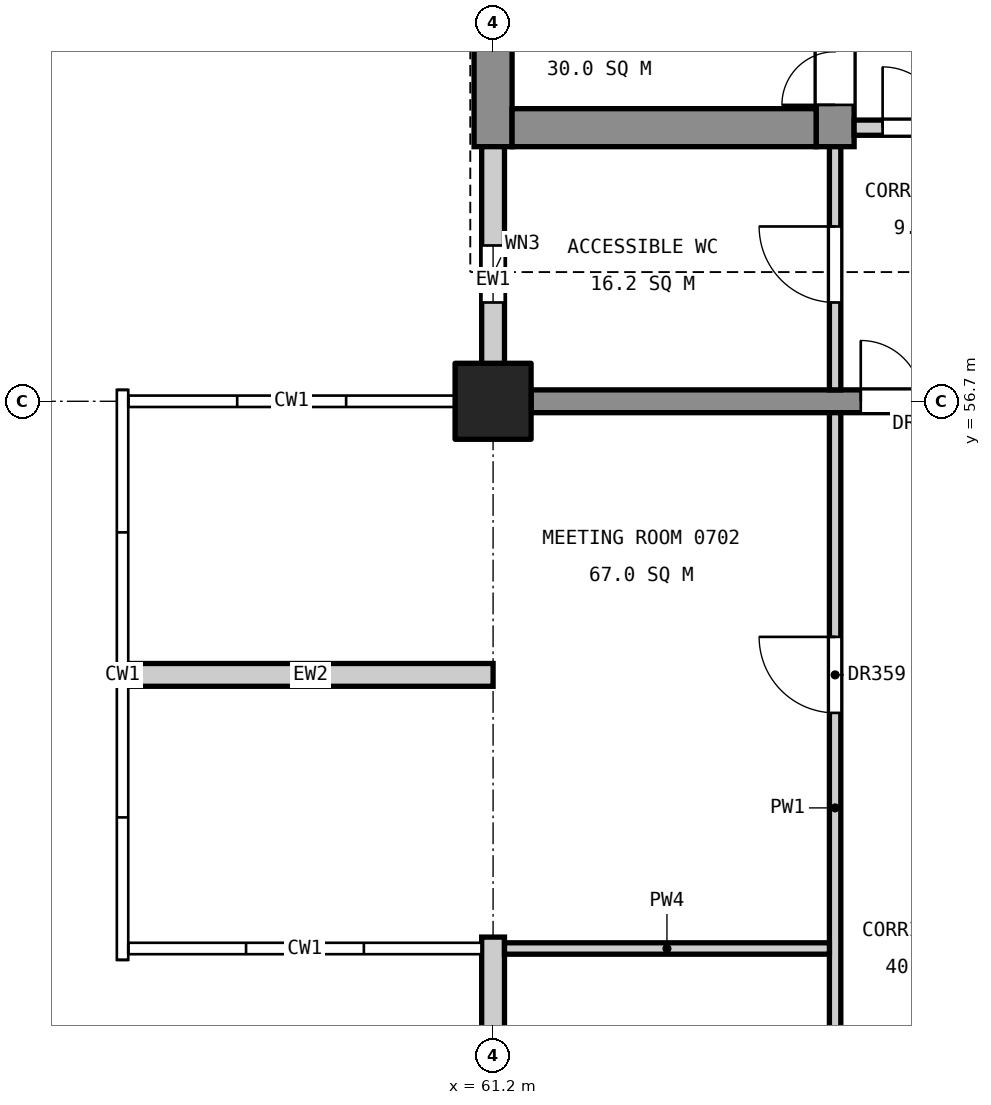
"""IFC4 building model, lengths in metres.
Left out: names, types, materials, properties, quantities, classifications, styles, units other than length and angle.
Written with IfcOpenShell. Run it as: python <this file> out.ifc"""

import sys

from ifc_helpers import new_model, si_unit, direction, frame, frame_2d, origin, origin_2d, place, context, subcontext, project, spatial, rectangle, extrude, element, fill, save


model = new_model("IFC4")
c1 = context("Model", 3, precision=1e-05, world=origin(), true_north=direction((0.0, 1.0)))
c2 = subcontext(c1, "Body", "Model", "MODEL_VIEW")
j1 = project(units=[si_unit("LENGTHUNIT", "METRE"), si_unit("PLANEANGLEUNIT", "RADIAN")], contexts=[c1])
p1 = place(None, origin())
s1 = spatial("IfcSite", under=j1, at=p1, CompositionType="ELEMENT")
p2 = place(p1, origin())
s2 = spatial("IfcBuilding", under=s1, at=p2, CompositionType="ELEMENT")
p3 = place(p2, frame((0.0, 0.0, 36.6)))
s3 = spatial("IfcBuildingStorey", under=s2, at=p3, CompositionType="ELEMENT", Elevation=36.6)
p4 = place(p3, frame((61.2, 56.7, 0.0), z_axis=(0.0, 0.0, 1.0), x_axis=(1.0, 0.0, 0.0)))
e1 = element("IfcColumn", 1, at=p4, inside=s3, PredefinedType="COLUMN", context=c2, shape_type="SweptSolid", body=[
    extrude(rectangle(XDim=1.0, YDim=1.0, at=origin_2d()), origin(), (0.0, 0.0, 1.0), 4.8),
])
p5 = place(p3, frame((61.2, 60.05, 0.0), z_axis=(0.0, 0.0, 1.0), x_axis=(0.0, 1.0, 0.0)))
e2 = element("IfcWall", 2, at=p5, inside=s3, PredefinedType="SHEAR", context=c2, shape_type="SweptSolid", body=[
    extrude(rectangle(XDim=14.9, YDim=0.5, at=frame_2d((7.45, 0.0))), origin(), (0.0, 0.0, 1.0), 4.55),
])
p6 = place(p5, frame((6.16, 0.0, 3.4)))
e3 = element("IfcOpeningElement", 3, at=p6, cuts=e2, PredefinedType="OPENING", context=c2, shape_type="SweptSolid", body=[
    extrude(rectangle(XDim=1.2, YDim=0.9, at=frame_2d((0.6, 0.45))), frame((0.0, 0.26, 0.0), z_axis=(0.0, -1.0, 0.0), x_axis=(1.0, 0.0, 0.0)), (0.0, 0.0, 1.0), 0.52),
])
p7 = place(p3, frame((65.7, 60.05, 0.0), z_axis=(0.0, 0.0, 1.0), x_axis=(0.0, 1.0, 0.0)))
e4 = element("IfcWall", 4, at=p7, inside=s3, PredefinedType="SHEAR", context=c2, shape_type="SweptSolid", body=[
    extrude(rectangle(XDim=14.9, YDim=0.5, at=frame_2d((7.45, 0.0))), origin(), (0.0, 0.0, 1.0), 4.55),
])
p8 = place(p7, frame((0.55, 0.0, 0.0)))
e5 = element("IfcOpeningElement", 5, at=p8, cuts=e4, PredefinedType="OPENING", context=c2, shape_type="SweptSolid", body=[
    extrude(rectangle(XDim=1.4, YDim=2.1, at=frame_2d((0.7, 1.05))), frame((0.0, 0.26, 0.0), z_axis=(0.0, -1.0, 0.0), x_axis=(1.0, 0.0, 0.0)), (0.0, 0.0, 1.0), 0.52),
])
p9 = place(p7, frame((8.85, 0.0, 0.0)))
e6 = element("IfcOpeningElement", 6, at=p9, cuts=e4, PredefinedType="OPENING", context=c2, shape_type="SweptSolid", body=[
    extrude(rectangle(XDim=1.1, YDim=2.1, at=frame_2d((0.55, 1.05))), frame((0.0, 0.26, 0.0), z_axis=(0.0, -1.0, 0.0), x_axis=(1.0, 0.0, 0.0)), (0.0, 0.0, 1.0), 0.52),
])
p10 = place(p7, frame((11.4, 0.0, 0.0)))
e7 = element("IfcOpeningElement", 7, at=p10, cuts=e4, PredefinedType="OPENING", context=c2, shape_type="SweptSolid", body=[
    extrude(rectangle(XDim=1.1, YDim=2.1, at=frame_2d((0.55, 1.05))), frame((0.0, 0.26, 0.0), z_axis=(0.0, -1.0, 0.0), x_axis=(1.0, 0.0, 0.0)), (0.0, 0.0, 1.0), 0.52),
])
p11 = place(p3, frame((61.45, 60.3, 0.0), z_axis=(0.0, 0.0, 1.0), x_axis=(1.0, 0.0, 0.0)))
e8 = element("IfcWall", 8, at=p11, inside=s3, PredefinedType="SHEAR", context=c2, shape_type="SweptSolid", body=[
    extrude(rectangle(XDim=4.0, YDim=0.5, at=frame_2d((2.0, 0.0))), origin(), (0.0, 0.0, 1.0), 4.55),
])
p12 = place(p3, frame((61.7, 56.7, 0.0), z_axis=(0.0, 0.0, 1.0), x_axis=(1.0, 0.0, 0.0)))
e9 = element("IfcWall", 9, at=p12, inside=s3, PredefinedType="SHEAR", context=c2, shape_type="SweptSolid", body=[
    extrude(rectangle(XDim=6.2, YDim=0.3, at=frame_2d((3.1, 0.0))), origin(), (0.0, 0.0, 1.0), 4.55),
])
p13 = place(p12, frame((4.337, 0.0, 0.0)))
e10 = element("IfcOpeningElement", 10, at=p13, cuts=e9, PredefinedType="OPENING", context=c2, shape_type="SweptSolid", body=[
    extrude(rectangle(XDim=1.6, YDim=2.1, at=frame_2d((0.8, 1.05))), frame((0.0, 0.16, 0.0), z_axis=(0.0, -1.0, 0.0), x_axis=(1.0, 0.0, 0.0)), (0.0, 0.0, 1.0), 0.32),
])
p14 = place(p3, frame((61.2, 46.15, 0.0), z_axis=(0.0, 0.0, 1.0), x_axis=(0.0, 1.0, 0.0)))
e11 = element("IfcWall", 11, at=p14, inside=s3, PredefinedType="STANDARD", context=c2, shape_type="SweptSolid", body=[
    extrude(rectangle(XDim=3.5, YDim=0.3, at=frame_2d((1.75, 0.0))), origin(), (0.0, 0.0, 1.0), 3.65),
])
p15 = place(p14, frame((1.3, 0.0, 0.8)))
e12 = element("IfcOpeningElement", 12, at=p15, cuts=e11, PredefinedType="OPENING", context=c2, shape_type="SweptSolid", body=[
    extrude(rectangle(XDim=0.75, YDim=1.2, at=frame_2d((0.375, 0.6))), frame((0.0, 0.16, 0.0), z_axis=(0.0, -1.0, 0.0), x_axis=(1.0, 0.0, 0.0)), (0.0, 0.0, 1.0), 0.32),
])
p16 = place(p3, frame((61.2, 56.55, 0.0), z_axis=(0.0, 0.0, 1.0), x_axis=(0.0, 1.0, 0.0)))
e13 = element("IfcWall", 13, at=p16, inside=s3, PredefinedType="STANDARD", context=c2, shape_type="SweptSolid", body=[
    extrude(rectangle(XDim=3.5, YDim=0.3, at=frame_2d((1.75, 0.0))), origin(), (0.0, 0.0, 1.0), 3.65),
])
p17 = place(p16, frame((1.45, 0.0, 0.8)))
e14 = element("IfcOpeningElement", 14, at=p17, cuts=e13, PredefinedType="OPENING", context=c2, shape_type="SweptSolid", body=[
    extrude(rectangle(XDim=0.75, YDim=1.2, at=frame_2d((0.375, 0.6))), frame((0.0, 0.16, 0.0), z_axis=(0.0, -1.0, 0.0), x_axis=(1.0, 0.0, 0.0)), (0.0, 0.0, 1.0), 0.32),
])
p18 = place(p3, frame((56.4, 53.1, 0.0), z_axis=(0.0, 0.0, 1.0), x_axis=(1.0, 0.0, 0.0)))
e15 = element("IfcWall", 15, at=p18, inside=s3, PredefinedType="STANDARD", context=c2, shape_type="SweptSolid", body=[
    extrude(rectangle(XDim=4.8, YDim=0.3, at=frame_2d((2.4, 0.0))), origin(), (0.0, 0.0, 1.0), 3.65),
])
p19 = place(p3, frame((65.7, 46.15, 0.0), z_axis=(0.0, 0.0, 1.0), x_axis=(0.0, 1.0, 0.0)))
e16 = element("IfcWall", 16, at=p19, inside=s3, PredefinedType="PARTITIONING", context=c2, shape_type="SweptSolid", body=[
    extrude(rectangle(XDim=10.4, YDim=0.15, at=frame_2d((5.2, 0.0))), origin(), (0.0, 0.0, 1.0), 3.55),
])
p20 = place(p19, frame((1.05, 0.0, 0.0)))
e17 = element("IfcOpeningElement", 17, at=p20, cuts=e16, PredefinedType="OPENING", context=c2, shape_type="SweptSolid", body=[
    extrude(rectangle(XDim=1.0, YDim=2.1, at=frame_2d((0.5, 1.05))), frame((0.0, 0.085, 0.0), z_axis=(0.0, -1.0, 0.0), x_axis=(1.0, 0.0, 0.0)), (0.0, 0.0, 1.0), 0.17),
])
p21 = place(p19, frame((6.45, 0.0, 0.0)))
e18 = element("IfcOpeningElement", 18, at=p21, cuts=e16, PredefinedType="OPENING", context=c2, shape_type="SweptSolid", body=[
    extrude(rectangle(XDim=1.0, YDim=2.1, at=frame_2d((0.5, 1.05))), frame((0.0, 0.085, 0.0), z_axis=(0.0, -1.0, 0.0), x_axis=(1.0, 0.0, 0.0)), (0.0, 0.0, 1.0), 0.17),
])
p22 = place(p3, frame((65.7, 56.85, 0.0), z_axis=(0.0, 0.0, 1.0), x_axis=(0.0, 1.0, 0.0)))
e19 = element("IfcWall", 19, at=p22, inside=s3, PredefinedType="PARTITIONING", context=c2, shape_type="SweptSolid", body=[
    extrude(rectangle(XDim=3.2, YDim=0.15, at=frame_2d((1.6, 0.0))), origin(), (0.0, 0.0, 1.0), 3.55),
])
p23 = place(p22, frame((1.15, 0.0, 0.0)))
e20 = element("IfcOpeningElement", 20, at=p23, cuts=e19, PredefinedType="OPENING", context=c2, shape_type="SweptSolid", body=[
    extrude(rectangle(XDim=1.0, YDim=2.1, at=frame_2d((0.5, 1.05))), frame((0.0, 0.085, 0.0), z_axis=(0.0, -1.0, 0.0), x_axis=(1.0, 0.0, 0.0)), (0.0, 0.0, 1.0), 0.17),
])
p24 = place(p3, frame((61.35, 49.5, 0.0), z_axis=(0.0, 0.0, 1.0), x_axis=(1.0, 0.0, 0.0)))
e21 = element("IfcWall", 21, at=p24, inside=s3, PredefinedType="PARTITIONING", context=c2, shape_type="SweptSolid", body=[
    extrude(rectangle(XDim=4.275, YDim=0.15, at=frame_2d((2.137, 0.0))), origin(), (0.0, 0.0, 1.0), 3.85),
])
p25 = place(p3, frame((65.95, 60.3, 0.0), z_axis=(0.0, 0.0, 1.0), x_axis=(1.0, 0.0, 0.0)))
e22 = element("IfcWall", 22, at=p25, inside=s3, PredefinedType="PARTITIONING", context=c2, shape_type="SweptSolid", body=[
    extrude(rectangle(XDim=2.35, YDim=0.2, at=frame_2d((1.175, 0.0))), origin(), (0.0, 0.0, 1.0), 3.85),
])
p26 = place(p25, frame((0.375, 0.0, 0.0)))
e23 = element("IfcOpeningElement", 23, at=p26, cuts=e22, PredefinedType="OPENING", context=c2, shape_type="SweptSolid", body=[
    extrude(rectangle(XDim=1.6, YDim=2.1, at=frame_2d((0.8, 1.05))), frame((0.0, 0.11, 0.0), z_axis=(0.0, -1.0, 0.0), x_axis=(1.0, 0.0, 0.0)), (0.0, 0.0, 1.0), 0.22),
])
p27 = place(p8, origin())
e24 = element("IfcDoor", 24, at=p27, inside=s3, OperationType="DOUBLE_DOOR_SINGLE_SWING", PredefinedType="DOOR", context=c2, shape_type="SweptSolid", body=[
    extrude(rectangle(XDim=1.4, YDim=2.1, at=frame_2d((0.7, 1.05))), frame((0.0, 0.025, 0.0), z_axis=(0.0, -1.0, 0.0), x_axis=(1.0, 0.0, 0.0)), (0.0, 0.0, 1.0), 0.05),
])
fill(e5, e24)
p28 = place(p17, origin())
e25 = element("IfcWindow", 25, at=p28, inside=s3, PartitioningType="SINGLE_PANEL", PredefinedType="WINDOW", context=c2, shape_type="SweptSolid", body=[
    extrude(rectangle(XDim=0.75, YDim=1.2, at=frame_2d((0.375, 0.6))), frame((0.0, 0.03, 0.0), z_axis=(0.0, -1.0, 0.0), x_axis=(1.0, 0.0, 0.0)), (0.0, 0.0, 1.0), 0.06),
])
fill(e14, e25)
p29 = place(p23, origin())
e26 = element("IfcDoor", 26, at=p29, inside=s3, OperationType="SINGLE_SWING_RIGHT", PredefinedType="DOOR", context=c2, shape_type="SweptSolid", body=[
    extrude(rectangle(XDim=1.0, YDim=2.1, at=frame_2d((0.5, 1.05))), frame((0.0, 0.025, 0.0), z_axis=(0.0, -1.0, 0.0), x_axis=(1.0, 0.0, 0.0)), (0.0, 0.0, 1.0), 0.05),
])
fill(e20, e26)
p30 = place(p21, origin())
e27 = element("IfcDoor", 27, at=p30, inside=s3, OperationType="SINGLE_SWING_RIGHT", PredefinedType="DOOR", context=c2, shape_type="SweptSolid", body=[
    extrude(rectangle(XDim=1.0, YDim=2.1, at=frame_2d((0.5, 1.05))), frame((0.0, 0.025, 0.0), z_axis=(0.0, -1.0, 0.0), x_axis=(1.0, 0.0, 0.0)), (0.0, 0.0, 1.0), 0.05),
])
fill(e18, e27)
p31 = place(p26, origin())
e28 = element("IfcDoor", 28, at=p31, inside=s3, OperationType="DOUBLE_DOOR_SINGLE_SWING", PredefinedType="DOOR", context=c2, shape_type="SweptSolid", body=[
    extrude(rectangle(XDim=1.6, YDim=2.1, at=frame_2d((0.8, 1.05))), frame((0.0, 0.025, 0.0), z_axis=(0.0, -1.0, 0.0), x_axis=(1.0, 0.0, 0.0)), (0.0, 0.0, 1.0), 0.05),
])
fill(e23, e28)
p32 = place(p13, origin())
e29 = element("IfcDoor", 29, at=p32, inside=s3, OperationType="DOUBLE_DOOR_SINGLE_SWING", PredefinedType="DOOR", context=c2, shape_type="SweptSolid", body=[
    extrude(rectangle(XDim=1.6, YDim=2.1, at=frame_2d((0.8, 1.05))), frame((0.0, 0.025, 0.0), z_axis=(0.0, -1.0, 0.0), x_axis=(1.0, 0.0, 0.0)), (0.0, 0.0, 1.0), 0.05),
])
fill(e10, e29)
save(model, sys.argv[1])
